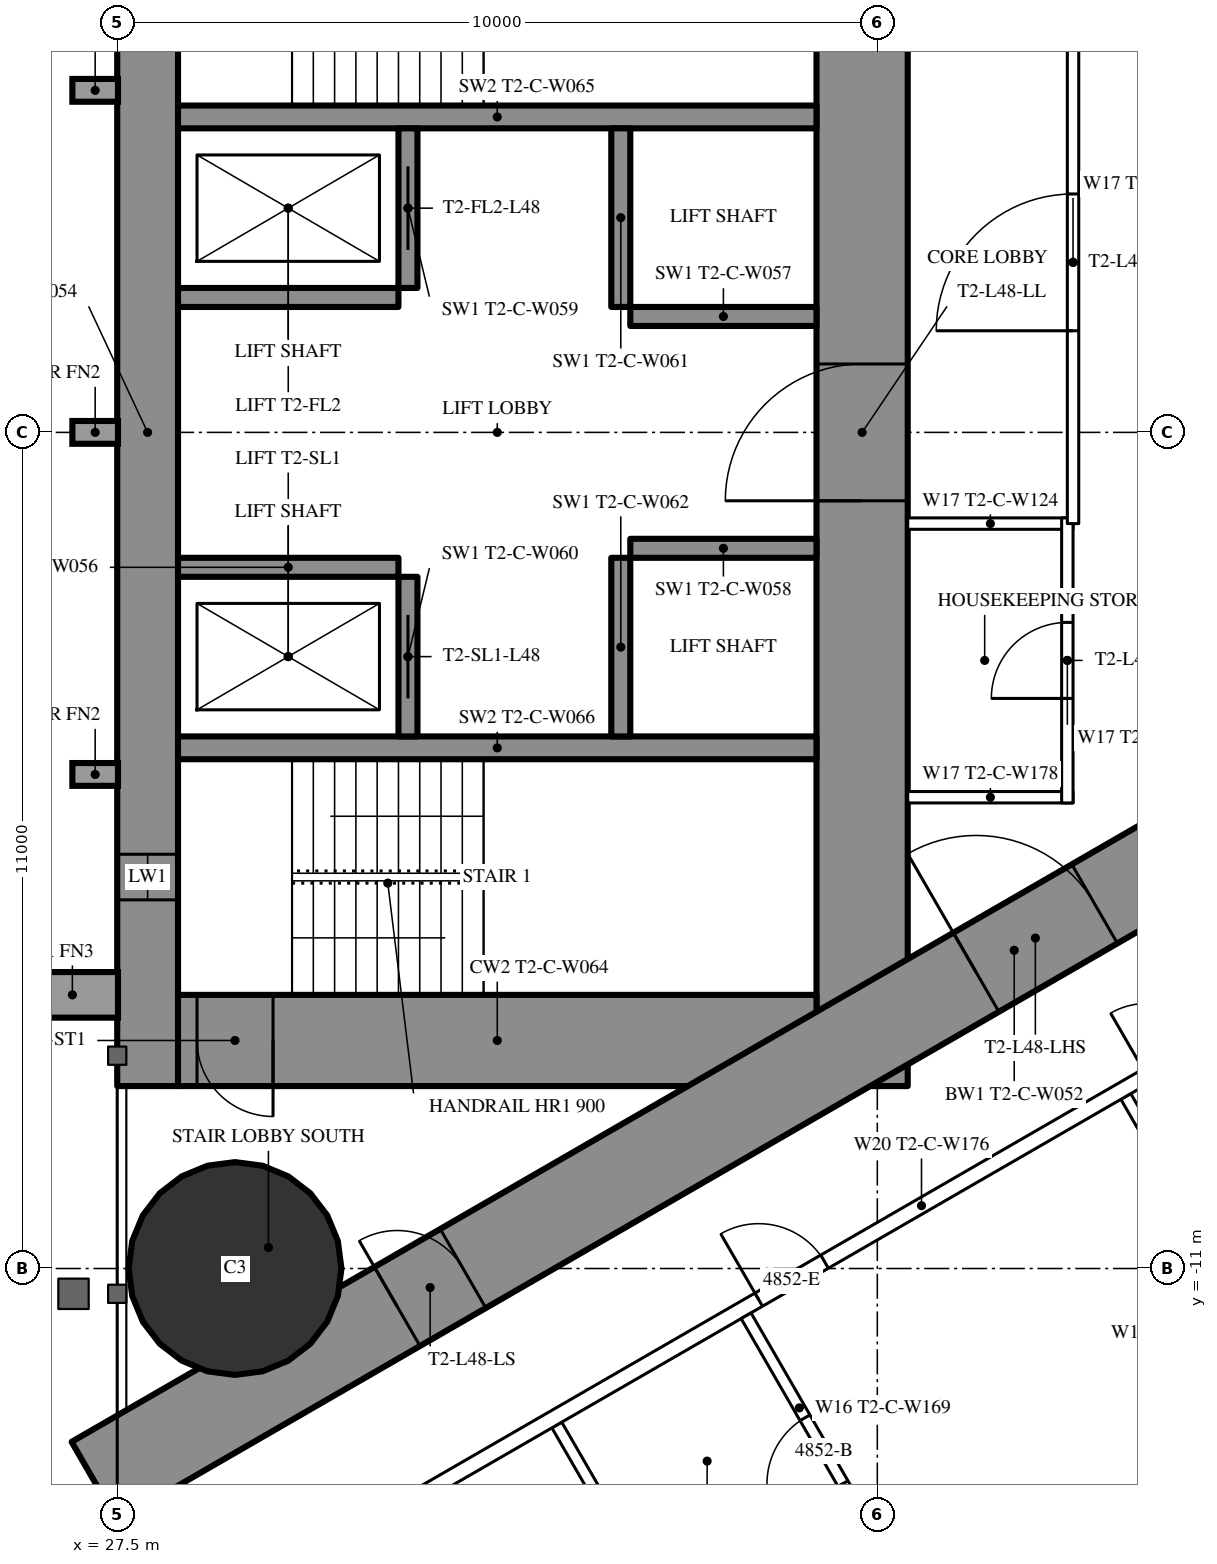
"""IFC4 building model, lengths in metres.
Left out: names, types, materials, properties, quantities, classifications, styles, units other than length and angle.
Written with IfcOpenShell. Run it as: python <this file> out.ifc"""

import sys

from ifc_helpers import new_model, si_unit, direction, frame, frame_2d, origin, origin_2d, place, context, subcontext, project, spatial, rectangle, circle, extrude, element, fill, save


model = new_model("IFC4")
c1 = context("Model", 3, precision=1e-05, world=origin(), true_north=direction((0.0, 1.0)))
c2 = subcontext(c1, "Body", "Model", "MODEL_VIEW")
j1 = project(units=[si_unit("LENGTHUNIT", "METRE"), si_unit("PLANEANGLEUNIT", "RADIAN")], contexts=[c1])
p1 = place(None, origin())
s1 = spatial("IfcSite", under=j1, at=p1, CompositionType="ELEMENT")
p2 = place(p1, origin())
s2 = spatial("IfcBuilding", under=s1, at=p2, CompositionType="ELEMENT")
p3 = place(p2, frame((0.0, 0.0, 180.8)))
s3 = spatial("IfcBuildingStorey", under=s2, at=p3, CompositionType="ELEMENT", Elevation=180.8)
p4 = place(p3, frame((29.05, -11.0, 0.0), z_axis=(0.0, 0.0, 1.0), x_axis=(1.0, 0.0, 0.0)))
e1 = element("IfcColumn", 1, at=p4, inside=s3, PredefinedType="COLUMN", context=c2, shape_type="SweptSolid", body=[
    extrude(circle(Radius=1.4, at=origin_2d()), origin(), (0.0, 0.0, 1.0), 3.5),
])
p5 = place(p3, frame((27.9, -8.6, 0.0), z_axis=(0.0, 0.0, 1.0), x_axis=(0.0, 1.0, 0.0)))
e2 = element("IfcWall", 2, at=p5, inside=s3, PredefinedType="SHEAR", context=c2, shape_type="SweptSolid", body=[
    extrude(rectangle(XDim=17.2, YDim=0.8, at=frame_2d((8.6, 0.0))), origin(), (0.0, 0.0, 1.0), 3.5),
])
p6 = place(p5, frame((2.45, 0.0, 0.6)))
e3 = element("IfcOpeningElement", 3, at=p6, cuts=e2, PredefinedType="OPENING", context=c2, shape_type="SweptSolid", body=[
    extrude(rectangle(XDim=0.6, YDim=2.1, at=frame_2d((0.3, 1.05))), frame((0.0, 0.41, 0.0), z_axis=(0.0, -1.0, 0.0), x_axis=(1.0, 0.0, 0.0)), (0.0, 0.0, 1.0), 0.82),
])
p7 = place(p5, frame((14.15, 0.0, 0.6)))
e4 = element("IfcOpeningElement", 4, at=p7, cuts=e2, PredefinedType="OPENING", context=c2, shape_type="SweptSolid", body=[
    extrude(rectangle(XDim=0.6, YDim=2.1, at=frame_2d((0.3, 1.05))), frame((0.0, 0.41, 0.0), z_axis=(0.0, -1.0, 0.0), x_axis=(1.0, 0.0, 0.0)), (0.0, 0.0, 1.0), 0.82),
])
p8 = place(p3, frame((37.3, -8.6, 0.0), z_axis=(0.0, 0.0, 1.0), x_axis=(0.0, 1.0, 0.0)))
e5 = element("IfcWall", 5, at=p8, inside=s3, PredefinedType="SHEAR", context=c2, shape_type="SweptSolid", body=[
    extrude(rectangle(XDim=17.2, YDim=1.2, at=frame_2d((8.6, 0.0))), origin(), (0.0, 0.0, 1.0), 3.5),
])
p9 = place(p8, frame((7.7, 0.0, 0.0)))
e6 = element("IfcOpeningElement", 6, at=p9, cuts=e5, PredefinedType="OPENING", context=c2, shape_type="SweptSolid", body=[
    extrude(rectangle(XDim=1.8, YDim=2.2, at=frame_2d((0.9, 1.1))), frame((0.0, 0.61, 0.0), z_axis=(0.0, -1.0, 0.0), x_axis=(1.0, 0.0, 0.0)), (0.0, 0.0, 1.0), 1.22),
])
p10 = place(p3, frame((28.3, -8.0, 0.0), z_axis=(0.0, 0.0, 1.0), x_axis=(1.0, 0.0, 0.0)))
e7 = element("IfcWall", 7, at=p10, inside=s3, PredefinedType="SHEAR", context=c2, shape_type="SweptSolid", body=[
    extrude(rectangle(XDim=8.4, YDim=1.2, at=frame_2d((4.2, 0.0))), origin(), (0.0, 0.0, 1.0), 3.5),
])
p11 = place(p10, frame((0.25, 0.0, 0.0)))
e8 = element("IfcOpeningElement", 8, at=p11, cuts=e7, PredefinedType="OPENING", context=c2, shape_type="SweptSolid", body=[
    extrude(rectangle(XDim=1.0, YDim=2.2, at=frame_2d((0.5, 1.1))), frame((0.0, 0.61, 0.0), z_axis=(0.0, -1.0, 0.0), x_axis=(1.0, 0.0, 0.0)), (0.0, 0.0, 1.0), 1.22),
])
for number, where, z_axis, x_axis in (
    (9, (28.3, -4.15, 0.0), (0.0, 0.0, 1.0), (1.0, 0.0, 0.0)),
    (10, (28.3, 4.15, 0.0), (0.0, 0.0, 1.0), (1.0, 0.0, 0.0)),
):
    element("IfcWall", number, at=place(p3, frame(where, z_axis=z_axis, x_axis=x_axis)), inside=s3, PredefinedType="SHEAR", context=c2, shape_type="SweptSolid", body=[
        extrude(rectangle(XDim=8.4, YDim=0.3, at=frame_2d((4.2, 0.0))), origin(), (0.0, 0.0, 1.0), 3.5),
    ])
p12 = place(p3, frame((31.325, -4.0, 0.0), z_axis=(0.0, 0.0, 1.0), x_axis=(0.0, 1.0, 0.0)))
e11 = element("IfcWall", 11, at=p12, inside=s3, PredefinedType="SHEAR", context=c2, shape_type="SweptSolid", body=[
    extrude(rectangle(XDim=2.1, YDim=0.25, at=frame_2d((1.05, 0.0))), origin(), (0.0, 0.0, 1.0), 3.5),
])
p13 = place(p12, frame((0.5, 0.0, 0.0)))
e12 = element("IfcOpeningElement", 12, at=p13, cuts=e11, PredefinedType="OPENING", context=c2, shape_type="SweptSolid", body=[
    extrude(rectangle(XDim=1.1, YDim=2.2, at=frame_2d((0.55, 1.1))), frame((0.0, 0.135, 0.0), z_axis=(0.0, -1.0, 0.0), x_axis=(1.0, 0.0, 0.0)), (0.0, 0.0, 1.0), 0.27),
])
p14 = place(p3, frame((34.125, -4.0, 0.0), z_axis=(0.0, 0.0, 1.0), x_axis=(0.0, 1.0, 0.0)))
e13 = element("IfcWall", 13, at=p14, inside=s3, PredefinedType="SHEAR", context=c2, shape_type="SweptSolid", body=[
    extrude(rectangle(XDim=2.35, YDim=0.25, at=frame_2d((1.175, 0.0))), origin(), (0.0, 0.0, 1.0), 3.5),
])
p15 = place(p3, frame((28.3, -1.775, 0.0), z_axis=(0.0, 0.0, 1.0), x_axis=(1.0, 0.0, 0.0)))
e14 = element("IfcWall", 14, at=p15, inside=s3, PredefinedType="SHEAR", context=c2, shape_type="SweptSolid", body=[
    extrude(rectangle(XDim=2.9, YDim=0.25, at=frame_2d((1.45, 0.0))), origin(), (0.0, 0.0, 1.0), 3.5),
])
p16 = place(p3, frame((34.25, -1.525, 0.0), z_axis=(0.0, 0.0, 1.0), x_axis=(1.0, 0.0, 0.0)))
e15 = element("IfcWall", 15, at=p16, inside=s3, PredefinedType="SHEAR", context=c2, shape_type="SweptSolid", body=[
    extrude(rectangle(XDim=2.45, YDim=0.25, at=frame_2d((1.225, 0.0))), origin(), (0.0, 0.0, 1.0), 3.5),
])
p17 = place(p3, frame((31.325, 1.9, 0.0), z_axis=(0.0, 0.0, 1.0), x_axis=(0.0, 1.0, 0.0)))
e16 = element("IfcWall", 16, at=p17, inside=s3, PredefinedType="SHEAR", context=c2, shape_type="SweptSolid", body=[
    extrude(rectangle(XDim=2.1, YDim=0.25, at=frame_2d((1.05, 0.0))), origin(), (0.0, 0.0, 1.0), 3.5),
])
p18 = place(p17, frame((0.5, 0.0, 0.0)))
e17 = element("IfcOpeningElement", 17, at=p18, cuts=e16, PredefinedType="OPENING", context=c2, shape_type="SweptSolid", body=[
    extrude(rectangle(XDim=1.1, YDim=2.2, at=frame_2d((0.55, 1.1))), frame((0.0, 0.135, 0.0), z_axis=(0.0, -1.0, 0.0), x_axis=(1.0, 0.0, 0.0)), (0.0, 0.0, 1.0), 0.27),
])
p19 = place(p3, frame((34.125, 1.65, 0.0), z_axis=(0.0, 0.0, 1.0), x_axis=(0.0, 1.0, 0.0)))
e18 = element("IfcWall", 18, at=p19, inside=s3, PredefinedType="SHEAR", context=c2, shape_type="SweptSolid", body=[
    extrude(rectangle(XDim=2.35, YDim=0.25, at=frame_2d((1.175, 0.0))), origin(), (0.0, 0.0, 1.0), 3.5),
])
p20 = place(p3, frame((28.3, 1.775, 0.0), z_axis=(0.0, 0.0, 1.0), x_axis=(1.0, 0.0, 0.0)))
e19 = element("IfcWall", 19, at=p20, inside=s3, PredefinedType="SHEAR", context=c2, shape_type="SweptSolid", body=[
    extrude(rectangle(XDim=2.9, YDim=0.25, at=frame_2d((1.45, 0.0))), origin(), (0.0, 0.0, 1.0), 3.5),
])
p21 = place(p3, frame((34.25, 1.525, 0.0), z_axis=(0.0, 0.0, 1.0), x_axis=(1.0, 0.0, 0.0)))
e20 = element("IfcWall", 20, at=p21, inside=s3, PredefinedType="SHEAR", context=c2, shape_type="SweptSolid", body=[
    extrude(rectangle(XDim=2.45, YDim=0.25, at=frame_2d((1.225, 0.0))), origin(), (0.0, 0.0, 1.0), 3.5),
])
p22 = place(p3, frame((27.2, -13.8, 0.0), z_axis=(0.0, 0.0, 1.0), x_axis=(0.866027159892, 0.499996958321, 0.0)))
e21 = element("IfcWall", 21, at=p22, inside=s3, PredefinedType="SHEAR", context=c2, shape_type="SweptSolid", body=[
    extrude(rectangle(XDim=27.947, YDim=1.2, at=frame_2d((13.973, 0.0))), origin(), (0.0, 0.0, 1.0), 3.5),
])
p23 = place(p22, frame((4.6, 0.0, 0.0)))
e22 = element("IfcOpeningElement", 22, at=p23, cuts=e21, PredefinedType="OPENING", context=c2, shape_type="SweptSolid", body=[
    extrude(rectangle(XDim=1.0, YDim=2.2, at=frame_2d((0.5, 1.1))), frame((0.0, 0.61, 0.0), z_axis=(0.0, -1.0, 0.0), x_axis=(1.0, 0.0, 0.0)), (0.0, 0.0, 1.0), 1.22),
])
p24 = place(p22, frame((13.395, 0.0, 0.0)))
e23 = element("IfcOpeningElement", 23, at=p24, cuts=e21, PredefinedType="OPENING", context=c2, shape_type="SweptSolid", body=[
    extrude(rectangle(XDim=1.8, YDim=2.2, at=frame_2d((0.9, 1.1))), frame((0.0, 0.61, 0.0), z_axis=(0.0, -1.0, 0.0), x_axis=(1.0, 0.0, 0.0)), (0.0, 0.0, 1.0), 1.22),
])
p25 = place(p3, frame((27.2, 13.8, 0.0), z_axis=(0.0, 0.0, 1.0), x_axis=(0.866024515034, -0.500001539357, 0.0)))
e24 = element("IfcWall", 24, at=p25, inside=s3, PredefinedType="SHEAR", context=c2, shape_type="SweptSolid", body=[
    extrude(rectangle(XDim=26.907, YDim=1.2, at=frame_2d((13.454, 0.0))), origin(), (0.0, 0.0, 1.0), 3.5),
])
p26 = place(p25, frame((4.6, 0.0, 0.0)))
e25 = element("IfcOpeningElement", 25, at=p26, cuts=e24, PredefinedType="OPENING", context=c2, shape_type="SweptSolid", body=[
    extrude(rectangle(XDim=1.0, YDim=2.2, at=frame_2d((0.5, 1.1))), frame((0.0, 0.61, 0.0), z_axis=(0.0, -1.0, 0.0), x_axis=(1.0, 0.0, 0.0)), (0.0, 0.0, 1.0), 1.22),
])
p27 = place(p25, frame((13.395, 0.0, 0.0)))
e26 = element("IfcOpeningElement", 26, at=p27, cuts=e24, PredefinedType="OPENING", context=c2, shape_type="SweptSolid", body=[
    extrude(rectangle(XDim=1.8, YDim=2.2, at=frame_2d((0.9, 1.1))), frame((0.0, 0.61, 0.0), z_axis=(0.0, -1.0, 0.0), x_axis=(1.0, 0.0, 0.0)), (0.0, 0.0, 1.0), 1.22),
])
p28 = place(p3, frame((33.284, -13.059, 0.0), z_axis=(0.0, 0.0, 1.0), x_axis=(0.499985904184, -0.866033541855, 0.0)))
e27 = element("IfcWall", 27, at=p28, inside=s3, PredefinedType="PARTITIONING", context=c2, shape_type="SweptSolid", body=[
    extrude(rectangle(XDim=9.385, YDim=0.15, at=frame_2d((4.693, 0.0))), origin(), (0.0, 0.0, 1.0), 3.25),
])
p29 = place(p3, frame((40.769, -8.737, 0.0), z_axis=(0.0, 0.0, 1.0), x_axis=(0.500013115284, -0.866017831539, 0.0)))
e28 = element("IfcWall", 28, at=p29, inside=s3, PredefinedType="PARTITIONING", context=c2, shape_type="SweptSolid", body=[
    extrude(rectangle(XDim=7.198, YDim=0.15, at=frame_2d((3.599, 0.0))), origin(), (0.0, 0.0, 1.0), 2.3),
])
p30 = place(p3, frame((27.959, -16.017, 0.0), z_axis=(0.0, 0.0, 1.0), x_axis=(0.866024180982, 0.50000211795, 0.0)))
e29 = element("IfcWall", 29, at=p30, inside=s3, PredefinedType="PARTITIONING", context=c2, shape_type="SweptSolid", body=[
    extrude(rectangle(XDim=23.375, YDim=0.2, at=frame_2d((11.688, 0.0))), origin(), (0.0, 0.0, 1.0), 3.25),
])
p31 = place(p30, frame((2.415, 0.0, 0.0)))
e30 = element("IfcOpeningElement", 30, at=p31, cuts=e29, PredefinedType="OPENING", context=c2, shape_type="SweptSolid", body=[
    extrude(rectangle(XDim=0.95, YDim=2.2, at=frame_2d((0.475, 1.1))), frame((0.0, 0.11, 0.0), z_axis=(0.0, -1.0, 0.0), x_axis=(1.0, 0.0, 0.0)), (0.0, 0.0, 1.0), 0.22),
])
p32 = place(p30, frame((9.215, 0.0, 0.0)))
e31 = element("IfcOpeningElement", 31, at=p32, cuts=e29, PredefinedType="OPENING", context=c2, shape_type="SweptSolid", body=[
    extrude(rectangle(XDim=1.0, YDim=2.2, at=frame_2d((0.5, 1.1))), frame((0.0, 0.11, 0.0), z_axis=(0.0, -1.0, 0.0), x_axis=(1.0, 0.0, 0.0)), (0.0, 0.0, 1.0), 0.22),
])
p33 = place(p30, frame((15.109, 0.0, 0.0)))
e32 = element("IfcOpeningElement", 32, at=p33, cuts=e29, PredefinedType="OPENING", context=c2, shape_type="SweptSolid", body=[
    extrude(rectangle(XDim=0.95, YDim=2.2, at=frame_2d((0.475, 1.1))), frame((0.0, 0.11, 0.0), z_axis=(0.0, -1.0, 0.0), x_axis=(1.0, 0.0, 0.0)), (0.0, 0.0, 1.0), 0.22),
])
p34 = place(p3, frame((35.773, -11.621, 0.0), z_axis=(0.0, 0.0, 1.0), x_axis=(0.49998411664, -0.866034573852, 0.0)))
e33 = element("IfcWall", 33, at=p34, inside=s3, PredefinedType="PARTITIONING", context=c2, shape_type="SweptSolid", body=[
    extrude(rectangle(XDim=2.8, YDim=0.15, at=frame_2d((1.4, 0.0))), origin(), (0.0, 0.0, 1.0), 3.25),
])
p35 = place(p34, frame((1.55, 0.0, 0.0)))
e34 = element("IfcOpeningElement", 34, at=p35, cuts=e33, PredefinedType="OPENING", context=c2, shape_type="SweptSolid", body=[
    extrude(rectangle(XDim=1.0, YDim=2.2, at=frame_2d((0.5, 1.1))), frame((0.0, 0.085, 0.0), z_axis=(0.0, -1.0, 0.0), x_axis=(1.0, 0.0, 0.0)), (0.0, 0.0, 1.0), 0.17),
])
for number, where, z_axis, x_axis in (
    (35, (37.9, -1.2, 0.0), (0.0, 0.0, 1.0), (1.0, 0.0, 0.0)),
    (36, (37.9, -4.8, 0.0), (0.0, 0.0, 1.0), (1.0, 0.0, 0.0)),
):
    element("IfcWall", number, at=place(p3, frame(where, z_axis=z_axis, x_axis=x_axis)), inside=s3, PredefinedType="PARTITIONING", context=c2, shape_type="SweptSolid", body=[
        extrude(rectangle(XDim=2.175, YDim=0.15, at=frame_2d((1.087, 0.0))), origin(), (0.0, 0.0, 1.0), 3.25),
    ])
p36 = place(p3, frame((40.0, -4.875, 0.0), z_axis=(0.0, 0.0, 1.0), x_axis=(0.0, 1.0, 0.0)))
e37 = element("IfcWall", 37, at=p36, inside=s3, PredefinedType="PARTITIONING", context=c2, shape_type="SweptSolid", body=[
    extrude(rectangle(XDim=3.75, YDim=0.15, at=frame_2d((1.875, 0.0))), origin(), (0.0, 0.0, 1.0), 3.25),
])
p37 = place(p36, frame((1.375, 0.0, 0.0)))
e38 = element("IfcOpeningElement", 38, at=p37, cuts=e37, PredefinedType="OPENING", context=c2, shape_type="SweptSolid", body=[
    extrude(rectangle(XDim=1.0, YDim=2.2, at=frame_2d((0.5, 1.1))), frame((0.0, 0.085, 0.0), z_axis=(0.0, -1.0, 0.0), x_axis=(1.0, 0.0, 0.0)), (0.0, 0.0, 1.0), 0.17),
])
p38 = place(p3, frame((40.075, -1.2, 0.0), z_axis=(0.0, 0.0, 1.0), x_axis=(0.0, 1.0, 0.0)))
e39 = element("IfcWall", 39, at=p38, inside=s3, PredefinedType="PARTITIONING", context=c2, shape_type="SweptSolid", body=[
    extrude(rectangle(XDim=6.874, YDim=0.15, at=frame_2d((3.437, 0.0))), origin(), (0.0, 0.0, 1.0), 3.25),
])
p39 = place(p38, frame((2.537, 0.0, 0.0)))
e40 = element("IfcOpeningElement", 40, at=p39, cuts=e39, PredefinedType="OPENING", context=c2, shape_type="SweptSolid", body=[
    extrude(rectangle(XDim=1.8, YDim=2.2, at=frame_2d((0.9, 1.1))), frame((0.0, 0.085, 0.0), z_axis=(0.0, -1.0, 0.0), x_axis=(1.0, 0.0, 0.0)), (0.0, 0.0, 1.0), 0.17),
])
p40 = place(p35, origin())
e41 = element("IfcDoor", 41, at=p40, inside=s3, OperationType="SINGLE_SWING_RIGHT", PredefinedType="DOOR", context=c2, shape_type="SweptSolid", body=[
    extrude(rectangle(XDim=1.0, YDim=2.2, at=frame_2d((0.5, 1.1))), frame((0.0, 0.025, 0.0), z_axis=(0.0, -1.0, 0.0), x_axis=(1.0, 0.0, 0.0)), (0.0, 0.0, 1.0), 0.05),
])
fill(e34, e41)
p41 = place(p32, origin())
e42 = element("IfcDoor", 42, at=p41, inside=s3, OperationType="SINGLE_SWING_LEFT", PredefinedType="DOOR", context=c2, shape_type="SweptSolid", body=[
    extrude(rectangle(XDim=1.0, YDim=2.2, at=frame_2d((0.5, 1.1))), frame((0.0, 0.025, 0.0), z_axis=(0.0, -1.0, 0.0), x_axis=(1.0, 0.0, 0.0)), (0.0, 0.0, 1.0), 0.05),
])
fill(e31, e42)
p42 = place(p37, origin())
e43 = element("IfcDoor", 43, at=p42, inside=s3, OperationType="SINGLE_SWING_LEFT", PredefinedType="DOOR", context=c2, shape_type="SweptSolid", body=[
    extrude(rectangle(XDim=1.0, YDim=2.2, at=frame_2d((0.5, 1.1))), frame((0.0, 0.025, 0.0), z_axis=(0.0, -1.0, 0.0), x_axis=(1.0, 0.0, 0.0)), (0.0, 0.0, 1.0), 0.05),
])
fill(e38, e43)
p43 = place(p39, origin())
e44 = element("IfcDoor", 44, at=p43, inside=s3, OperationType="DOUBLE_DOOR_SINGLE_SWING", PredefinedType="DOOR", context=c2, shape_type="SweptSolid", body=[
    extrude(rectangle(XDim=1.8, YDim=2.2, at=frame_2d((0.9, 1.1))), frame((0.0, 0.025, 0.0), z_axis=(0.0, -1.0, 0.0), x_axis=(1.0, 0.0, 0.0)), (0.0, 0.0, 1.0), 0.05),
])
fill(e40, e44)
p44 = place(p23, origin())
e45 = element("IfcDoor", 45, at=p44, inside=s3, OperationType="SINGLE_SWING_LEFT", PredefinedType="DOOR", context=c2, shape_type="SweptSolid", body=[
    extrude(rectangle(XDim=1.0, YDim=2.2, at=frame_2d((0.5, 1.1))), frame((0.0, 0.025, 0.0), z_axis=(0.0, -1.0, 0.0), x_axis=(1.0, 0.0, 0.0)), (0.0, 0.0, 1.0), 0.05),
])
fill(e22, e45)
p45 = place(p24, origin())
e46 = element("IfcDoor", 46, at=p45, inside=s3, OperationType="DOUBLE_DOOR_SINGLE_SWING", PredefinedType="DOOR", context=c2, shape_type="SweptSolid", body=[
    extrude(rectangle(XDim=1.8, YDim=2.2, at=frame_2d((0.9, 1.1))), frame((0.0, 0.025, 0.0), z_axis=(0.0, -1.0, 0.0), x_axis=(1.0, 0.0, 0.0)), (0.0, 0.0, 1.0), 0.05),
])
fill(e23, e46)
p46 = place(p9, origin())
e47 = element("IfcDoor", 47, at=p46, inside=s3, OperationType="DOUBLE_DOOR_SINGLE_SWING", PredefinedType="DOOR", context=c2, shape_type="SweptSolid", body=[
    extrude(rectangle(XDim=1.8, YDim=2.2, at=frame_2d((0.9, 1.1))), frame((0.0, 0.025, 0.0), z_axis=(0.0, -1.0, 0.0), x_axis=(1.0, 0.0, 0.0)), (0.0, 0.0, 1.0), 0.05),
])
fill(e6, e47)
p47 = place(p11, origin())
e48 = element("IfcDoor", 48, at=p47, inside=s3, OperationType="SINGLE_SWING_RIGHT", PredefinedType="DOOR", context=c2, shape_type="SweptSolid", body=[
    extrude(rectangle(XDim=1.0, YDim=2.2, at=frame_2d((0.5, 1.1))), frame((0.0, 0.025, 0.0), z_axis=(0.0, -1.0, 0.0), x_axis=(1.0, 0.0, 0.0)), (0.0, 0.0, 1.0), 0.05),
])
fill(e8, e48)
p48 = place(p13, origin())
e49 = element("IfcDoor", 49, at=p48, inside=s3, OperationType="SLIDING_TO_LEFT", PredefinedType="USERDEFINED", context=c2, shape_type="SweptSolid", body=[
    extrude(rectangle(XDim=1.1, YDim=2.2, at=frame_2d((0.55, 1.1))), frame((0.0, 0.025, 0.0), z_axis=(0.0, -1.0, 0.0), x_axis=(1.0, 0.0, 0.0)), (0.0, 0.0, 1.0), 0.05),
])
fill(e12, e49)
p49 = place(p18, origin())
e50 = element("IfcDoor", 50, at=p49, inside=s3, OperationType="SLIDING_TO_LEFT", PredefinedType="USERDEFINED", context=c2, shape_type="SweptSolid", body=[
    extrude(rectangle(XDim=1.1, YDim=2.2, at=frame_2d((0.55, 1.1))), frame((0.0, 0.025, 0.0), z_axis=(0.0, -1.0, 0.0), x_axis=(1.0, 0.0, 0.0)), (0.0, 0.0, 1.0), 0.05),
])
fill(e17, e50)
p50 = place(p6, origin())
e51 = element("IfcWindow", 51, at=p50, inside=s3, PartitioningType="SINGLE_PANEL", PredefinedType="WINDOW", context=c2, shape_type="SweptSolid", body=[
    extrude(rectangle(XDim=0.6, YDim=2.1, at=frame_2d((0.3, 1.05))), frame((0.0, 0.03, 0.0), z_axis=(0.0, -1.0, 0.0), x_axis=(1.0, 0.0, 0.0)), (0.0, 0.0, 1.0), 0.06),
])
fill(e3, e51)
save(model, sys.argv[1])
